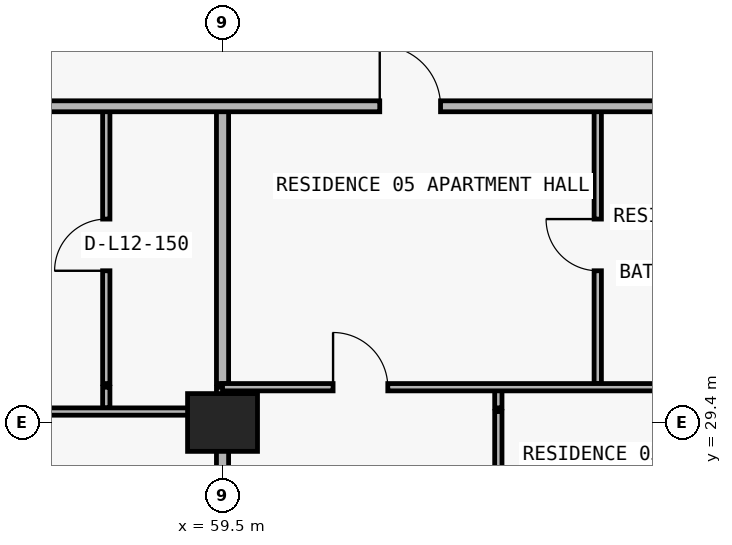
"""IFC4 building model, lengths in metres.
Left out: names, types, materials, properties, quantities, classifications, styles, units other than length and angle.
Written with IfcOpenShell. Run it as: python <this file> out.ifc"""

import sys

from ifc_helpers import new_model, si_unit, direction, frame, frame_2d, origin, origin_2d, place, context, subcontext, project, spatial, rectangle, extrude, element, fill, save


model = new_model("IFC4")
c1 = context("Model", 3, precision=1e-05, world=origin(), true_north=direction((0.0, 1.0)))
c2 = subcontext(c1, "Body", "Model", "MODEL_VIEW")
j1 = project(units=[si_unit("LENGTHUNIT", "METRE"), si_unit("PLANEANGLEUNIT", "RADIAN")], contexts=[c1])
p1 = place(None, origin())
s1 = spatial("IfcSite", under=j1, at=p1, CompositionType="ELEMENT")
p2 = place(p1, origin())
s2 = spatial("IfcBuilding", under=s1, at=p2, CompositionType="ELEMENT")
p3 = place(p2, frame((0.0, 0.0, 49.8)))
s3 = spatial("IfcBuildingStorey", under=s2, at=p3, CompositionType="ELEMENT", Elevation=49.8)
p4 = place(p3, frame((59.5, 29.4, 0.0), z_axis=(0.0, 0.0, 1.0), x_axis=(1.0, 0.0, 0.0)))
e1 = element("IfcColumn", 1, at=p4, inside=s3, PredefinedType="COLUMN", context=c2, shape_type="SweptSolid", body=[
    extrude(rectangle(XDim=1.15, YDim=0.95, at=origin_2d()), origin(), (0.0, 0.0, 1.0), 3.05),
])
p5 = place(p3, frame((57.588, 29.64, 0.0), z_axis=(0.0, 0.0, 1.0), x_axis=(0.0, 1.0, 0.0)))
e2 = element("IfcWall", 2, at=p5, inside=s3, PredefinedType="PARTITIONING", context=c2, shape_type="SweptSolid", body=[
    extrude(rectangle(XDim=0.34, YDim=0.12, at=frame_2d((0.17, 0.0))), origin(), (0.0, 0.0, 1.0), 3.05),
])
p6 = place(p3, frame((57.588, 30.04, 0.0), z_axis=(0.0, 0.0, 1.0), x_axis=(0.0, 1.0, 0.0)))
e3 = element("IfcWall", 3, at=p6, inside=s3, PredefinedType="PARTITIONING", context=c2, shape_type="SweptSolid", body=[
    extrude(rectangle(XDim=4.56, YDim=0.12, at=frame_2d((2.28, 0.0))), origin(), (0.0, 0.0, 1.0), 3.05),
])
p7 = place(p6, frame((1.855, 0.0, 0.0)))
e4 = element("IfcOpeningElement", 4, at=p7, cuts=e3, PredefinedType="OPENING", context=c2, shape_type="SweptSolid", body=[
    extrude(rectangle(XDim=0.85, YDim=2.1, at=frame_2d((0.425, 1.05))), frame((0.0, 0.07, 0.0), z_axis=(0.0, -1.0, 0.0), x_axis=(1.0, 0.0, 0.0)), (0.0, 0.0, 1.0), 0.14),
])
p8 = place(p3, frame((59.5, 24.89, 0.0), z_axis=(0.0, 0.0, 1.0), x_axis=(0.0, 1.0, 0.0)))
e5 = element("IfcWall", 5, at=p8, inside=s3, PredefinedType="PARTITIONING", context=c2, shape_type="SweptSolid", body=[
    extrude(rectangle(XDim=4.69, YDim=0.2, at=frame_2d((2.345, 0.0))), origin(), (0.0, 0.0, 1.0), 2.11),
])
p9 = place(p3, frame((59.5, 29.64, 0.0), z_axis=(0.0, 0.0, 1.0), x_axis=(0.0, 1.0, 0.0)))
e6 = element("IfcWall", 6, at=p9, inside=s3, PredefinedType="PARTITIONING", context=c2, shape_type="SweptSolid", body=[
    extrude(rectangle(XDim=0.34, YDim=0.2, at=frame_2d((0.17, 0.0))), origin(), (0.0, 0.0, 1.0), 2.11),
])
p10 = place(p3, frame((59.5, 30.04, 0.0), z_axis=(0.0, 0.0, 1.0), x_axis=(0.0, 1.0, 0.0)))
e7 = element("IfcWall", 7, at=p10, inside=s3, PredefinedType="PARTITIONING", context=c2, shape_type="SweptSolid", body=[
    extrude(rectangle(XDim=4.56, YDim=0.2, at=frame_2d((2.28, 0.0))), origin(), (0.0, 0.0, 1.0), 2.11),
])
p11 = place(p3, frame((64.036, 24.89, 0.0), z_axis=(0.0, 0.0, 1.0), x_axis=(0.0, 1.0, 0.0)))
e8 = element("IfcWall", 8, at=p11, inside=s3, PredefinedType="PARTITIONING", context=c2, shape_type="SweptSolid", body=[
    extrude(rectangle(XDim=4.69, YDim=0.12, at=frame_2d((2.345, 0.0))), origin(), (0.0, 0.0, 1.0), 3.05),
])
p12 = place(p11, frame((1.895, 0.0, 0.0)))
e9 = element("IfcOpeningElement", 9, at=p12, cuts=e8, PredefinedType="OPENING", context=c2, shape_type="SweptSolid", body=[
    extrude(rectangle(XDim=0.9, YDim=2.15, at=frame_2d((0.45, 1.075))), frame((0.0, 0.07, 0.0), z_axis=(0.0, -1.0, 0.0), x_axis=(1.0, 0.0, 0.0)), (0.0, 0.0, 1.0), 0.14),
])
p13 = place(p3, frame((64.036, 29.64, 0.0), z_axis=(0.0, 0.0, 1.0), x_axis=(0.0, 1.0, 0.0)))
e10 = element("IfcWall", 10, at=p13, inside=s3, PredefinedType="PARTITIONING", context=c2, shape_type="SweptSolid", body=[
    extrude(rectangle(XDim=0.34, YDim=0.12, at=frame_2d((0.17, 0.0))), origin(), (0.0, 0.0, 1.0), 3.05),
])
p14 = place(p3, frame((65.671, 30.04, 0.0), z_axis=(0.0, 0.0, 1.0), x_axis=(0.0, 1.0, 0.0)))
e11 = element("IfcWall", 11, at=p14, inside=s3, PredefinedType="PARTITIONING", context=c2, shape_type="SweptSolid", body=[
    extrude(rectangle(XDim=4.56, YDim=0.12, at=frame_2d((2.28, 0.0))), origin(), (0.0, 0.0, 1.0), 3.05),
])
p15 = place(p14, frame((1.855, 0.0, 0.0)))
e12 = element("IfcOpeningElement", 12, at=p15, cuts=e11, PredefinedType="OPENING", context=c2, shape_type="SweptSolid", body=[
    extrude(rectangle(XDim=0.85, YDim=2.1, at=frame_2d((0.425, 1.05))), frame((0.0, 0.07, 0.0), z_axis=(0.0, -1.0, 0.0), x_axis=(1.0, 0.0, 0.0)), (0.0, 0.0, 1.0), 0.14),
])
p16 = place(p3, frame((51.1, 29.58, 0.0), z_axis=(0.0, 0.0, 1.0), x_axis=(1.0, 0.0, 0.0)))
e13 = element("IfcWall", 13, at=p16, inside=s3, PredefinedType="PARTITIONING", context=c2, shape_type="SweptSolid", body=[
    extrude(rectangle(XDim=8.4, YDim=0.12, at=frame_2d((4.2, 0.0))), origin(), (0.0, 0.0, 1.0), 2.11),
])
p17 = place(p16, frame((1.693, 0.0, 0.0)))
e14 = element("IfcOpeningElement", 14, at=p17, cuts=e13, PredefinedType="OPENING", context=c2, shape_type="SweptSolid", body=[
    extrude(rectangle(XDim=0.9, YDim=2.06, at=frame_2d((0.45, 1.03))), frame((0.0, 0.07, 0.0), z_axis=(0.0, -1.0, 0.0), x_axis=(1.0, 0.0, 0.0)), (0.0, 0.0, 1.0), 0.14),
])
p18 = place(p3, frame((59.5, 29.98, 0.0), z_axis=(0.0, 0.0, 1.0), x_axis=(1.0, 0.0, 0.0)))
e15 = element("IfcWall", 15, at=p18, inside=s3, PredefinedType="PARTITIONING", context=c2, shape_type="SweptSolid", body=[
    extrude(rectangle(XDim=8.4, YDim=0.12, at=frame_2d((4.2, 0.0))), origin(), (0.0, 0.0, 1.0), 3.05),
])
p19 = place(p18, frame((1.818, 0.0, 0.0)))
e16 = element("IfcOpeningElement", 16, at=p19, cuts=e15, PredefinedType="OPENING", context=c2, shape_type="SweptSolid", body=[
    extrude(rectangle(XDim=0.9, YDim=2.15, at=frame_2d((0.45, 1.075))), frame((0.0, 0.07, 0.0), z_axis=(0.0, -1.0, 0.0), x_axis=(1.0, 0.0, 0.0)), (0.0, 0.0, 1.0), 0.14),
])
p20 = place(p3, frame((5.105, 34.6, 0.0), z_axis=(0.0, 0.0, 1.0), x_axis=(1.0, 0.0, 0.0)))
e17 = element("IfcWall", 17, at=p20, inside=s3, PredefinedType="PARTITIONING", context=c2, shape_type="SweptSolid", body=[
    extrude(rectangle(XDim=67.595, YDim=0.18, at=frame_2d((33.797, 0.0))), origin(), (0.0, 0.0, 1.0), 3.05),
])
p21 = place(p20, frame((7.365, 0.0, 0.0)))
e18 = element("IfcOpeningElement", 18, at=p21, cuts=e17, PredefinedType="OPENING", context=c2, shape_type="SweptSolid", body=[
    extrude(rectangle(XDim=1.0, YDim=2.2, at=frame_2d((0.5, 1.1))), frame((0.0, 0.1, 0.0), z_axis=(0.0, -1.0, 0.0), x_axis=(1.0, 0.0, 0.0)), (0.0, 0.0, 1.0), 0.2),
])
p22 = place(p20, frame((15.927, 0.0, 0.0)))
e19 = element("IfcOpeningElement", 19, at=p22, cuts=e17, PredefinedType="OPENING", context=c2, shape_type="SweptSolid", body=[
    extrude(rectangle(XDim=1.0, YDim=2.2, at=frame_2d((0.5, 1.1))), frame((0.0, 0.1, 0.0), z_axis=(0.0, -1.0, 0.0), x_axis=(1.0, 0.0, 0.0)), (0.0, 0.0, 1.0), 0.2),
])
p23 = place(p20, frame((24.407, 0.0, 0.0)))
e20 = element("IfcOpeningElement", 20, at=p23, cuts=e17, PredefinedType="OPENING", context=c2, shape_type="SweptSolid", body=[
    extrude(rectangle(XDim=1.0, YDim=2.2, at=frame_2d((0.5, 1.1))), frame((0.0, 0.1, 0.0), z_axis=(0.0, -1.0, 0.0), x_axis=(1.0, 0.0, 0.0)), (0.0, 0.0, 1.0), 0.2),
])
p24 = place(p20, frame((48.739, 0.0, 0.0)))
e21 = element("IfcOpeningElement", 21, at=p24, cuts=e17, PredefinedType="OPENING", context=c2, shape_type="SweptSolid", body=[
    extrude(rectangle(XDim=1.0, YDim=2.2, at=frame_2d((0.5, 1.1))), frame((0.0, 0.1, 0.0), z_axis=(0.0, -1.0, 0.0), x_axis=(1.0, 0.0, 0.0)), (0.0, 0.0, 1.0), 0.2),
])
p25 = place(p20, frame((56.98, 0.0, 0.0)))
e22 = element("IfcOpeningElement", 22, at=p25, cuts=e17, PredefinedType="OPENING", context=c2, shape_type="SweptSolid", body=[
    extrude(rectangle(XDim=1.0, YDim=2.2, at=frame_2d((0.5, 1.1))), frame((0.0, 0.1, 0.0), z_axis=(0.0, -1.0, 0.0), x_axis=(1.0, 0.0, 0.0)), (0.0, 0.0, 1.0), 0.2),
])
p26 = place(p7, origin())
e23 = element("IfcDoor", 23, at=p26, inside=s3, OperationType="SINGLE_SWING_LEFT", PredefinedType="DOOR", context=c2, shape_type="SweptSolid", body=[
    extrude(rectangle(XDim=0.85, YDim=2.1, at=frame_2d((0.425, 1.05))), frame((0.0, 0.025, 0.0), z_axis=(0.0, -1.0, 0.0), x_axis=(1.0, 0.0, 0.0)), (0.0, 0.0, 1.0), 0.05),
])
fill(e4, e23)
p27 = place(p25, origin())
e24 = element("IfcDoor", 24, at=p27, inside=s3, OperationType="SINGLE_SWING_LEFT", PredefinedType="DOOR", context=c2, shape_type="SweptSolid", body=[
    extrude(rectangle(XDim=1.0, YDim=2.2, at=frame_2d((0.5, 1.1))), frame((0.0, 0.025, 0.0), z_axis=(0.0, -1.0, 0.0), x_axis=(1.0, 0.0, 0.0)), (0.0, 0.0, 1.0), 0.05),
])
fill(e22, e24)
p28 = place(p15, origin())
e25 = element("IfcDoor", 25, at=p28, inside=s3, OperationType="SINGLE_SWING_RIGHT", PredefinedType="DOOR", context=c2, shape_type="SweptSolid", body=[
    extrude(rectangle(XDim=0.85, YDim=2.1, at=frame_2d((0.425, 1.05))), frame((0.0, 0.025, 0.0), z_axis=(0.0, -1.0, 0.0), x_axis=(1.0, 0.0, 0.0)), (0.0, 0.0, 1.0), 0.05),
])
fill(e12, e25)
p29 = place(p19, origin())
e26 = element("IfcDoor", 26, at=p29, inside=s3, OperationType="SINGLE_SWING_LEFT", PredefinedType="DOOR", context=c2, shape_type="SweptSolid", body=[
    extrude(rectangle(XDim=0.9, YDim=2.15, at=frame_2d((0.45, 1.075))), frame((0.0, 0.025, 0.0), z_axis=(0.0, -1.0, 0.0), x_axis=(1.0, 0.0, 0.0)), (0.0, 0.0, 1.0), 0.05),
])
fill(e16, e26)
save(model, sys.argv[1])
